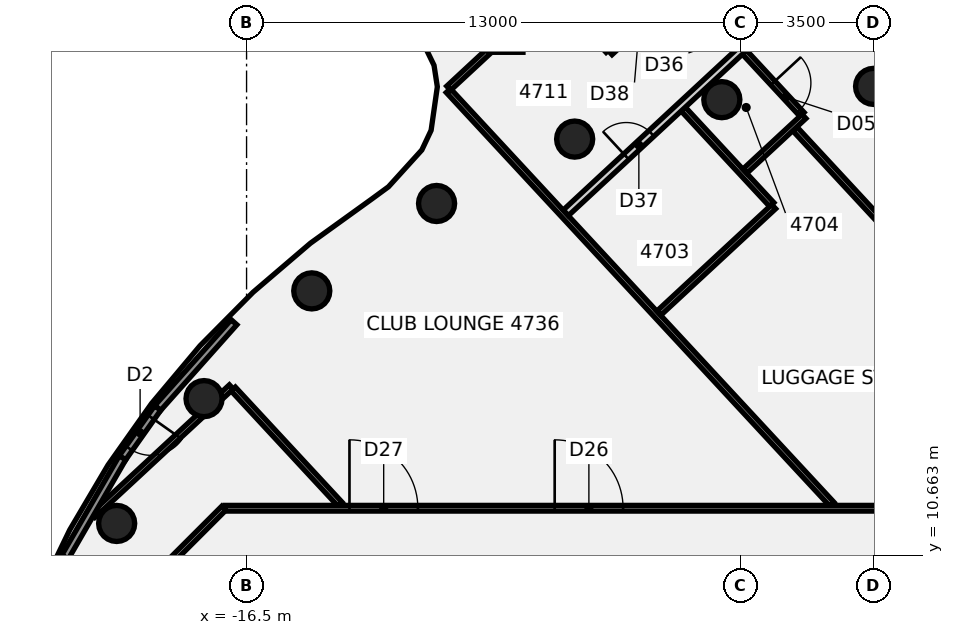
"""IFC4 building model, lengths in metres.
Left out: names, types, materials, properties, quantities, classifications, styles, units other than length and angle.
Written with IfcOpenShell. Run it as: python <this file> out.ifc"""

import sys

from ifc_helpers import new_model, si_unit, direction, frame, frame_2d, origin, origin_2d, place, context, subcontext, project, spatial, rectangle, circle, extrude, element, fill, save


model = new_model("IFC4")
c1 = context("Model", 3, precision=1e-05, world=origin(), true_north=direction((0.0, 1.0)))
c2 = subcontext(c1, "Body", "Model", "MODEL_VIEW")
j1 = project(units=[si_unit("LENGTHUNIT", "METRE"), si_unit("PLANEANGLEUNIT", "RADIAN")], contexts=[c1])
p1 = place(None, origin())
s1 = spatial("IfcSite", under=j1, at=p1, CompositionType="ELEMENT")
p2 = place(p1, origin())
s2 = spatial("IfcBuilding", under=s1, at=p2, CompositionType="ELEMENT")
p3 = place(p2, frame((0.0, 0.0, 189.7)))
s3 = spatial("IfcBuildingStorey", under=s2, at=p3, CompositionType="ELEMENT", Elevation=189.7)
for number, where, z_axis, x_axis in (
    (1, (0.0, 23.0, -0.14), (0.0, 0.0, 1.0), (1.0, 0.0, 0.0)),
    (2, (-3.994, 22.651, -0.14), (0.0, 0.0, 1.0), (1.0, 0.0, 0.0)),
    (3, (-7.866, 21.613, -0.14), (0.0, 0.0, 1.0), (1.0, 0.0, 0.0)),
    (4, (-11.5, 19.919, -0.14), (0.0, 0.0, 1.0), (1.0, 0.0, 0.0)),
    (5, (-14.784, 17.619, -0.14), (0.0, 0.0, 1.0), (1.0, 0.0, 0.0)),
    (6, (-17.619, 14.784, -0.14), (0.0, 0.0, 1.0), (1.0, 0.0, 0.0)),
    (7, (-19.919, 11.5, -0.14), (0.0, 0.0, 1.0), (1.0, 0.0, 0.0)),
):
    element("IfcColumn", number, at=place(p3, frame(where, z_axis=z_axis, x_axis=x_axis)), inside=s3, PredefinedType="COLUMN", context=c2, shape_type="SweptSolid", body=[
        extrude(circle(Radius=0.475, at=origin_2d()), origin(), (0.0, 0.0, 1.0), 3.6),
    ])
p4 = place(p3, frame((-9.677, 24.347, -0.139), z_axis=(-0.011386986819, -0.049004711131, 0.99873363557), x_axis=(0.732712476675, 0.679260584893, 0.041683142108)))
e8 = element("IfcColumn", 8, at=p4, inside=s3, PredefinedType="COLUMN", context=c2, shape_type="SweptSolid", body=[
    extrude(rectangle(XDim=0.9, YDim=0.9, at=origin_2d()), origin(), (0.0, 0.0, 1.0), 3.602),
])
p5 = place(p3, frame((-16.85, 15.037, 0.0), z_axis=(0.0, 0.0, 1.0), x_axis=(0.67983906824, -0.733361330651, 0.0)))
e9 = element("IfcWall", 9, at=p5, inside=s3, PredefinedType="PARTITIONING", context=c2, shape_type="SweptSolid", body=[
    extrude(rectangle(XDim=4.133, YDim=0.15, at=frame_2d((2.066, 0.0))), origin(), (0.0, 0.0, 1.0), 2.864),
])
p6 = place(p3, frame((-12.588, 33.811, 0.0), z_axis=(0.0, 0.0, 1.0), x_axis=(0.6797793132, -0.733416720116, 0.0)))
e10 = element("IfcWall", 10, at=p6, inside=s3, PredefinedType="PARTITIONING", context=c2, shape_type="SweptSolid", body=[
    extrude(rectangle(XDim=15.744, YDim=0.15, at=frame_2d((7.872, 0.0))), origin(), (0.0, 0.0, 1.0), 2.864),
])
p7 = place(p6, frame((14.619, 0.0, 0.0)))
e11 = element("IfcOpeningElement", 11, at=p7, cuts=e10, PredefinedType="OPENING", context=c2, shape_type="SweptSolid", body=[
    extrude(rectangle(XDim=1.0, YDim=2.1, at=frame_2d((0.5, 1.05))), frame((0.0, 0.085, 0.0), z_axis=(0.0, -1.0, 0.0), x_axis=(1.0, 0.0, 0.0)), (0.0, 0.0, 1.0), 0.17),
])
p8 = place(p6, frame((12.02, 0.0, 0.0)))
e12 = element("IfcOpeningElement", 12, at=p8, cuts=e10, PredefinedType="OPENING", context=c2, shape_type="SweptSolid", body=[
    extrude(rectangle(XDim=0.9, YDim=2.1, at=frame_2d((0.45, 1.05))), frame((0.0, 0.085, 0.0), z_axis=(0.0, -1.0, 0.0), x_axis=(1.0, 0.0, 0.0)), (0.0, 0.0, 1.0), 0.17),
])
p9 = place(p6, frame((5.32, 0.0, 0.0)))
e13 = element("IfcOpeningElement", 13, at=p9, cuts=e10, PredefinedType="OPENING", context=c2, shape_type="SweptSolid", body=[
    extrude(rectangle(XDim=0.9, YDim=2.1, at=frame_2d((0.45, 1.05))), frame((0.0, 0.085, 0.0), z_axis=(0.0, -1.0, 0.0), x_axis=(1.0, 0.0, 0.0)), (0.0, 0.0, 1.0), 0.17),
])
p10 = place(p6, frame((3.019, 0.0, 0.0)))
e14 = element("IfcOpeningElement", 14, at=p10, cuts=e10, PredefinedType="OPENING", context=c2, shape_type="SweptSolid", body=[
    extrude(rectangle(XDim=0.9, YDim=2.1, at=frame_2d((0.45, 1.05))), frame((0.0, 0.085, 0.0), z_axis=(0.0, -1.0, 0.0), x_axis=(1.0, 0.0, 0.0)), (0.0, 0.0, 1.0), 0.17),
])
p11 = place(p3, frame((-11.19, 22.89, 0.0), z_axis=(0.0, 0.0, 1.0), x_axis=(0.679949372444, -0.733259061255, 0.0)))
e15 = element("IfcWall", 15, at=p11, inside=s3, PredefinedType="PARTITIONING", context=c2, shape_type="SweptSolid", body=[
    extrude(rectangle(XDim=14.843, YDim=0.15, at=frame_2d((7.421, 0.0))), origin(), (0.0, 0.0, 1.0), 2.864),
])
p12 = place(p3, frame((-5.009, 22.402, 0.0), z_axis=(0.0, 0.0, 1.0), x_axis=(0.679947924825, -0.733260403627, 0.0)))
e16 = element("IfcWall", 16, at=p12, inside=s3, PredefinedType="PARTITIONING", context=c2, shape_type="SweptSolid", body=[
    extrude(rectangle(XDim=3.425, YDim=0.15, at=frame_2d((1.713, 0.0))), origin(), (0.0, 0.0, 1.0), 2.864),
])
p13 = place(p3, frame((-2.071, 21.88, 0.0), z_axis=(0.0, 0.0, 1.0), x_axis=(0.679904289686, -0.733300863811, 0.0)))
e17 = element("IfcWall", 17, at=p13, inside=s3, PredefinedType="PARTITIONING", context=c2, shape_type="SweptSolid", body=[
    extrude(rectangle(XDim=13.465, YDim=0.15, at=frame_2d((6.732, 0.0))), origin(), (0.0, 0.0, 1.0), 2.864),
])
p14 = place(p13, frame((4.42, 0.0, 0.0)))
e18 = element("IfcOpeningElement", 18, at=p14, cuts=e17, PredefinedType="OPENING", context=c2, shape_type="SweptSolid", body=[
    extrude(rectangle(XDim=0.9, YDim=2.1, at=frame_2d((0.45, 1.05))), frame((0.0, 0.085, 0.0), z_axis=(0.0, -1.0, 0.0), x_axis=(1.0, 0.0, 0.0)), (0.0, 0.0, 1.0), 0.17),
])
p15 = place(p3, frame((-17.065, 11.9, 0.0), z_axis=(0.0, 0.0, 1.0), x_axis=(1.0, 0.0, 0.0)))
e19 = element("IfcWall", 19, at=p15, inside=s3, PredefinedType="PARTITIONING", context=c2, shape_type="SweptSolid", body=[
    extrude(rectangle(XDim=34.165, YDim=0.15, at=frame_2d((17.083, 0.0))), origin(), (0.0, 0.0, 1.0), 2.864),
])
p16 = place(p15, frame((24.698, 0.0, 0.0)))
e20 = element("IfcOpeningElement", 20, at=p16, cuts=e19, PredefinedType="OPENING", context=c2, shape_type="SweptSolid", body=[
    extrude(rectangle(XDim=1.8, YDim=2.1, at=frame_2d((0.9, 1.05))), frame((0.0, 0.085, 0.0), z_axis=(0.0, -1.0, 0.0), x_axis=(1.0, 0.0, 0.0)), (0.0, 0.0, 1.0), 0.17),
])
p17 = place(p15, frame((8.673, 0.0, 0.0)))
e21 = element("IfcOpeningElement", 21, at=p17, cuts=e19, PredefinedType="OPENING", context=c2, shape_type="SweptSolid", body=[
    extrude(rectangle(XDim=1.8, YDim=2.1, at=frame_2d((0.9, 1.05))), frame((0.0, 0.085, 0.0), z_axis=(0.0, -1.0, 0.0), x_axis=(1.0, 0.0, 0.0)), (0.0, 0.0, 1.0), 0.17),
])
p18 = place(p15, frame((3.273, 0.0, 0.0)))
e22 = element("IfcOpeningElement", 22, at=p18, cuts=e19, PredefinedType="OPENING", context=c2, shape_type="SweptSolid", body=[
    extrude(rectangle(XDim=1.8, YDim=2.1, at=frame_2d((0.9, 1.05))), frame((0.0, 0.085, 0.0), z_axis=(0.0, -1.0, 0.0), x_axis=(1.0, 0.0, 0.0)), (0.0, 0.0, 1.0), 0.17),
])
p19 = place(p3, frame((-20.542, 11.715, 0.0), z_axis=(0.0, 0.0, 1.0), x_axis=(0.733232438966, 0.679978080858, 0.0)))
e23 = element("IfcWall", 23, at=p19, inside=s3, PredefinedType="PARTITIONING", context=c2, shape_type="SweptSolid", body=[
    extrude(rectangle(XDim=3.842, YDim=0.15, at=frame_2d((1.921, 0.0))), origin(), (0.0, 0.0, 1.0), 2.864),
])
p20 = place(p3, frame((-17.154, 14.858, 0.0), z_axis=(0.0, 0.0, 1.0), x_axis=(0.733499168144, 0.679690348859, 0.0)))
e24 = element("IfcWall", 24, at=p20, inside=s3, PredefinedType="PARTITIONING", context=c2, shape_type="SweptSolid", body=[
    extrude(rectangle(XDim=0.345, YDim=0.15, at=frame_2d((0.172, 0.0))), origin(), (0.0, 0.0, 1.0), 2.864),
])
p21 = place(p3, frame((-11.181, 22.952, 0.0), z_axis=(0.0, 0.0, 1.0), x_axis=(0.733245156738, 0.679964366802, 0.0)))
e25 = element("IfcWall", 25, at=p21, inside=s3, PredefinedType="PARTITIONING", context=c2, shape_type="SweptSolid", body=[
    extrude(rectangle(XDim=1.443, YDim=0.15, at=frame_2d((0.722, 0.0))), origin(), (0.0, 0.0, 1.0), 2.864),
])
p22 = place(p3, frame((-8.098, 19.673, 0.0), z_axis=(0.0, 0.0, 1.0), x_axis=(0.733267845556, 0.67993989931, 0.0)))
e26 = element("IfcWall", 26, at=p22, inside=s3, PredefinedType="PARTITIONING", context=c2, shape_type="SweptSolid", body=[
    extrude(rectangle(XDim=14.219, YDim=0.2, at=frame_2d((7.11, 0.0))), origin(), (0.0, 0.0, 1.0), 2.864),
])
p23 = place(p22, frame((6.62, 0.0, 0.0)))
e27 = element("IfcOpeningElement", 27, at=p23, cuts=e26, PredefinedType="OPENING", context=c2, shape_type="SweptSolid", body=[
    extrude(rectangle(XDim=1.4, YDim=2.1, at=frame_2d((0.7, 1.05))), frame((0.0, 0.11, 0.0), z_axis=(0.0, -1.0, 0.0), x_axis=(1.0, 0.0, 0.0)), (0.0, 0.0, 1.0), 0.22),
])
p24 = place(p22, frame((2.17, 0.0, 0.0)))
e28 = element("IfcOpeningElement", 28, at=p24, cuts=e26, PredefinedType="OPENING", context=c2, shape_type="SweptSolid", body=[
    extrude(rectangle(XDim=0.9, YDim=2.1, at=frame_2d((0.45, 1.05))), frame((0.0, 0.11, 0.0), z_axis=(0.0, -1.0, 0.0), x_axis=(1.0, 0.0, 0.0)), (0.0, 0.0, 1.0), 0.22),
])
p25 = place(p3, frame((-6.934, 23.889, 0.0), z_axis=(0.0, 0.0, 1.0), x_axis=(0.733334885153, 0.679867594623, 0.0)))
e29 = element("IfcWall", 29, at=p25, inside=s3, PredefinedType="PARTITIONING", context=c2, shape_type="SweptSolid", body=[
    extrude(rectangle(XDim=2.521, YDim=0.15, at=frame_2d((1.26, 0.0))), origin(), (0.0, 0.0, 1.0), 2.864),
])
p26 = place(p25, frame((0.6, 0.0, 0.0)))
e30 = element("IfcOpeningElement", 30, at=p26, cuts=e29, PredefinedType="OPENING", context=c2, shape_type="SweptSolid", body=[
    extrude(rectangle(XDim=0.9, YDim=2.1, at=frame_2d((0.45, 1.05))), frame((0.0, 0.085, 0.0), z_axis=(0.0, -1.0, 0.0), x_axis=(1.0, 0.0, 0.0)), (0.0, 0.0, 1.0), 0.17),
])
p27 = place(p3, frame((-5.65, 17.033, 0.0), z_axis=(0.0, 0.0, 1.0), x_axis=(0.733295549229, 0.679910021607, 0.0)))
e31 = element("IfcWall", 31, at=p27, inside=s3, PredefinedType="PARTITIONING", context=c2, shape_type="SweptSolid", body=[
    extrude(rectangle(XDim=4.12, YDim=0.15, at=frame_2d((2.06, 0.0))), origin(), (0.0, 0.0, 1.0), 2.864),
])
p28 = place(p3, frame((-3.386, 20.769, 0.0), z_axis=(0.0, 0.0, 1.0), x_axis=(0.733265024859, 0.679942941223, 0.0)))
e32 = element("IfcWall", 32, at=p28, inside=s3, PredefinedType="PARTITIONING", context=c2, shape_type="SweptSolid", body=[
    extrude(rectangle(XDim=2.12, YDim=0.15, at=frame_2d((1.06, 0.0))), origin(), (0.0, 0.0, 1.0), 2.864),
])
p29 = place(p3, frame((-18.872, 10.128, 0.0), z_axis=(0.0, 0.0, 1.0), x_axis=(0.707106781187, 0.707106781187, 0.0)))
e33 = element("IfcWall", 33, at=p29, inside=s3, PredefinedType="PARTITIONING", context=c2, shape_type="SweptSolid", body=[
    extrude(rectangle(XDim=2.505, YDim=0.15, at=frame_2d((1.253, 0.0))), origin(), (0.0, 0.0, 1.0), 2.864),
])
p30 = place(p3, frame((-16.83, 16.794, 0.0), z_axis=(0.0, 0.0, 1.0), x_axis=(-0.664915269841, -0.746918793399, 0.0)))
e34 = element("IfcWall", 34, at=p30, inside=s3, PredefinedType="SOLIDWALL", context=c2, shape_type="SweptSolid", body=[
    extrude(rectangle(XDim=3.022, YDim=0.2, at=frame_2d((1.511, 0.0))), origin(), (0.0, 0.0, 1.0), 3.46),
])
p31 = place(p3, frame((-19.763, 13.231, 0.0), z_axis=(0.0, 0.0, 1.0), x_axis=(-0.500701704226, -0.865619895442, 0.0)))
e35 = element("IfcWall", 35, at=p31, inside=s3, PredefinedType="SOLIDWALL", context=c2, shape_type="SweptSolid", body=[
    extrude(rectangle(XDim=3.021, YDim=0.2, at=frame_2d((1.51, 0.0))), origin(), (0.0, 0.0, 1.0), 3.46),
])
p32 = place(p3, frame((-18.839, 14.537, 0.0), z_axis=(0.0, 0.0, 1.0), x_axis=(-0.577653217212, -0.816282280001, 0.0)))
e36 = element("IfcWall", 36, at=p32, inside=s3, PredefinedType="SOLIDWALL", context=c2, shape_type="SweptSolid", body=[
    extrude(rectangle(XDim=1.6, YDim=0.2, at=frame_2d((0.8, 0.0))), origin(), (0.0, 0.0, 1.0), 3.46),
])
p33 = place(p32, frame((0.3, 0.0, 0.0)))
e37 = element("IfcOpeningElement", 37, at=p33, cuts=e36, PredefinedType="OPENING", context=c2, shape_type="SweptSolid", body=[
    extrude(rectangle(XDim=1.0, YDim=2.4, at=frame_2d((0.5, 1.2))), frame((0.0, 0.11, 0.0), z_axis=(0.0, -1.0, 0.0), x_axis=(1.0, 0.0, 0.0)), (0.0, 0.0, 1.0), 0.22),
])
p34 = place(p7, frame((1.0, 0.0, 0.0), z_axis=(0.0, 0.0, 1.0), x_axis=(-1.0, 0.0, 0.0)))
e38 = element("IfcDoor", 38, at=p34, inside=s3, OperationType="SINGLE_SWING_RIGHT", PredefinedType="DOOR", context=c2, shape_type="SweptSolid", body=[
    extrude(rectangle(XDim=1.0, YDim=2.1, at=frame_2d((0.5, 1.05))), frame((0.0, 0.025, 0.0), z_axis=(0.0, -1.0, 0.0), x_axis=(1.0, 0.0, 0.0)), (0.0, 0.0, 1.0), 0.05),
])
fill(e11, e38)
p35 = place(p17, origin())
e39 = element("IfcDoor", 39, at=p35, inside=s3, OperationType="DOUBLE_DOOR_SINGLE_SWING", PredefinedType="DOOR", context=c2, shape_type="SweptSolid", body=[
    extrude(rectangle(XDim=1.8, YDim=2.1, at=frame_2d((0.9, 1.05))), frame((0.0, 0.025, 0.0), z_axis=(0.0, -1.0, 0.0), x_axis=(1.0, 0.0, 0.0)), (0.0, 0.0, 1.0), 0.05),
])
fill(e21, e39)
p36 = place(p18, origin())
e40 = element("IfcDoor", 40, at=p36, inside=s3, OperationType="DOUBLE_DOOR_SINGLE_SWING", PredefinedType="DOOR", context=c2, shape_type="SweptSolid", body=[
    extrude(rectangle(XDim=1.8, YDim=2.1, at=frame_2d((0.9, 1.05))), frame((0.0, 0.025, 0.0), z_axis=(0.0, -1.0, 0.0), x_axis=(1.0, 0.0, 0.0)), (0.0, 0.0, 1.0), 0.05),
])
fill(e22, e40)
p37 = place(p24, frame((0.9, 0.0, 0.0), z_axis=(0.0, 0.0, 1.0), x_axis=(-1.0, 0.0, 0.0)))
e41 = element("IfcDoor", 41, at=p37, inside=s3, OperationType="SINGLE_SWING_LEFT", PredefinedType="DOOR", context=c2, shape_type="SweptSolid", body=[
    extrude(rectangle(XDim=0.9, YDim=2.1, at=frame_2d((0.45, 1.05))), frame((0.0, 0.025, 0.0), z_axis=(0.0, -1.0, 0.0), x_axis=(1.0, 0.0, 0.0)), (0.0, 0.0, 1.0), 0.05),
])
fill(e28, e41)
p38 = place(p33, origin())
e42 = element("IfcDoor", 42, at=p38, inside=s3, OperationType="SINGLE_SWING_LEFT", PredefinedType="DOOR", context=c2, shape_type="SweptSolid", body=[
    extrude(rectangle(XDim=1.0, YDim=2.4, at=frame_2d((0.5, 1.2))), frame((0.0, 0.025, 0.0), z_axis=(0.0, -1.0, 0.0), x_axis=(1.0, 0.0, 0.0)), (0.0, 0.0, 1.0), 0.05),
])
fill(e37, e42)
save(model, sys.argv[1])
